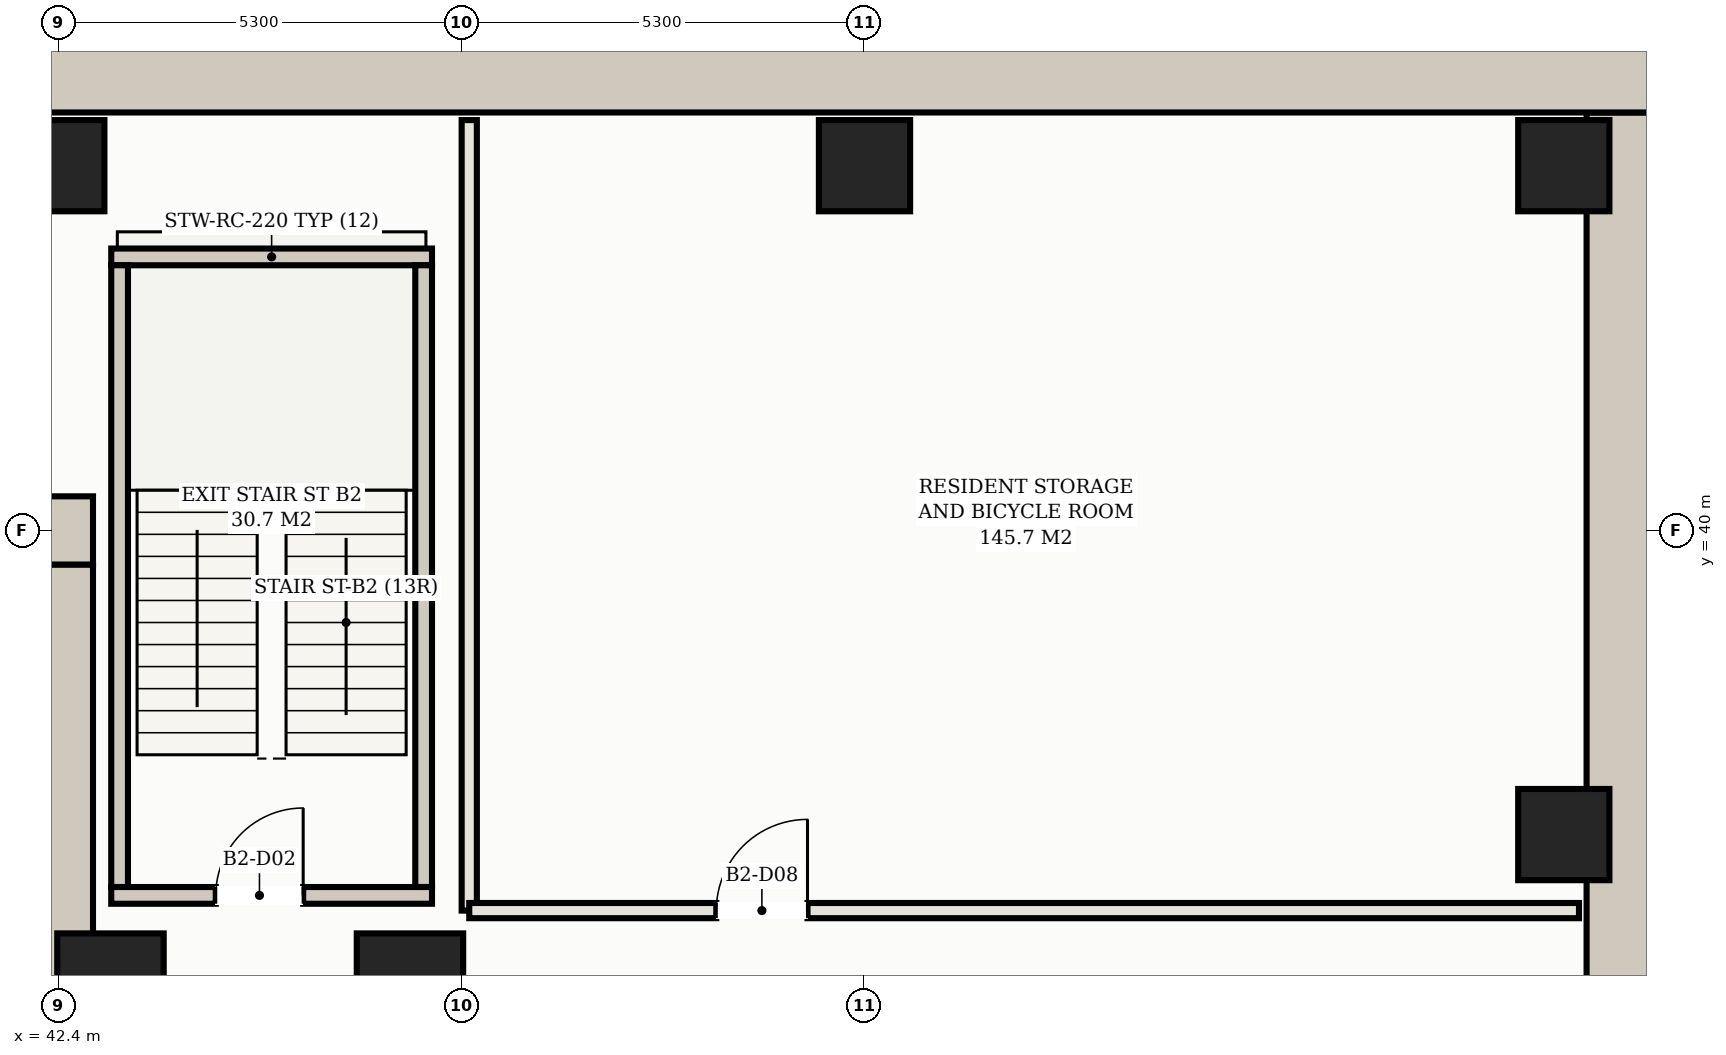
"""IFC4 building model, lengths in metres.
Left out: names, types, materials, properties, quantities, classifications, styles, units other than length and angle.
Written with IfcOpenShell. Run it as: python <this file> out.ifc"""

import sys

from ifc_helpers import new_model, si_unit, direction, frame, frame_2d, origin, origin_2d, place, context, subcontext, project, spatial, rectangle, hollow_rectangle, extrude, element, fill, save


model = new_model("IFC4")
c1 = context("Model", 3, precision=1e-05, world=origin(), true_north=direction((0.0, 1.0)))
c2 = subcontext(c1, "Body", "Model", "MODEL_VIEW")
j1 = project(units=[si_unit("LENGTHUNIT", "METRE"), si_unit("PLANEANGLEUNIT", "RADIAN")], contexts=[c1])
p1 = place(None, origin())
s1 = spatial("IfcSite", under=j1, at=p1, CompositionType="ELEMENT")
p2 = place(p1, origin())
s2 = spatial("IfcBuilding", under=s1, at=p2, CompositionType="ELEMENT")
p3 = place(p2, frame((0.0, 0.0, -8.4)))
s3 = spatial("IfcBuildingStorey", under=s2, at=p3, CompositionType="ELEMENT", Elevation=-8.4)
p4 = place(p3, frame((63.05, -7.3, 0.0), z_axis=(0.0, 0.0, 1.0), x_axis=(0.0, 1.0, 0.0)))
e1 = element("IfcWall", 1, at=p4, inside=s3, PredefinedType="USERDEFINED", context=c2, shape_type="SweptSolid", body=[
    extrude(rectangle(XDim=52.8, YDim=1.1, at=frame_2d((26.4, 0.0))), origin(), (0.0, 0.0, 1.0), 3.92),
])
p5 = place(p3, frame((63.6, 46.05, 0.0), z_axis=(0.0, 0.0, 1.0), x_axis=(-1.0, 0.0, 0.0)))
e2 = element("IfcWall", 2, at=p5, inside=s3, PredefinedType="USERDEFINED", context=c2, shape_type="SweptSolid", body=[
    extrude(rectangle(XDim=74.2, YDim=1.1, at=frame_2d((37.1, 0.0))), origin(), (0.0, 0.0, 1.0), 3.92),
])
p6 = place(p3, frame((10.15, 40.0, 0.0), z_axis=(0.0, 0.0, 1.0), x_axis=(1.0, 0.0, 0.0)))
e3 = element("IfcWall", 3, at=p6, inside=s3, PredefinedType="SHEAR", context=c2, shape_type="SweptSolid", body=[
    extrude(rectangle(XDim=32.7, YDim=0.9, at=frame_2d((16.35, 0.0))), origin(), (0.0, 0.0, 1.0), 3.92),
])
p7 = place(p3, frame((42.4, 25.65, 0.0), z_axis=(0.0, 0.0, 1.0), x_axis=(0.0, 1.0, 0.0)))
e4 = element("IfcWall", 4, at=p7, inside=s3, PredefinedType="SHEAR", context=c2, shape_type="SweptSolid", body=[
    extrude(rectangle(XDim=13.9, YDim=0.9, at=frame_2d((6.95, 0.0))), origin(), (0.0, 0.0, 1.0), 3.92),
])
for number, where, z_axis, x_axis in (
    (5, (42.4, 44.8, 0.0), (0.0, 0.0, 1.0), (1.0, 0.0, 0.0)),
    (6, (53.0, 44.8, 0.0), (0.0, 0.0, 1.0), (1.0, 0.0, 0.0)),
    (7, (62.2, 44.8, 0.0), (0.0, 0.0, 1.0), (1.0, 0.0, 0.0)),
    (8, (62.2, 36.0, 0.0), (0.0, 0.0, 1.0), (1.0, 0.0, 0.0)),
):
    element("IfcColumn", number, at=place(p3, frame(where, z_axis=z_axis, x_axis=x_axis)), inside=s3, PredefinedType="COLUMN", context=c2, shape_type="SweptSolid", body=[
        extrude(hollow_rectangle(XDim=1.2, YDim=1.2, WallThickness=0.04, at=origin_2d()), origin(), (0.0, 0.0, 1.0), 4.2),
    ])
for number, where, z_axis, x_axis in (
    (9, (47.02, 34.0, 0.0), (0.0, 0.0, 1.0), (1.0, 0.0, 0.0)),
    (10, (43.08, 34.0, 0.0), (0.0, 0.0, 1.0), (1.0, 0.0, 0.0)),
):
    element("IfcColumn", number, at=place(p3, frame(where, z_axis=z_axis, x_axis=x_axis)), inside=s3, PredefinedType="COLUMN", context=c2, shape_type="SweptSolid", body=[
        extrude(rectangle(XDim=1.4, YDim=1.4, at=origin_2d()), origin(), (0.0, 0.0, 1.0), 4.2),
    ])
p8 = place(p3, frame((43.09, 43.6, 0.0), z_axis=(0.0, 0.0, 1.0), x_axis=(1.0, 0.0, 0.0)))
e11 = element("IfcWall", 11, at=p8, inside=s3, PredefinedType="SHEAR", context=c2, shape_type="SweptSolid", body=[
    extrude(rectangle(XDim=4.22, YDim=0.22, at=frame_2d((2.11, 0.0))), origin(), (0.0, 0.0, 1.0), 3.92),
])
for number, where, z_axis, x_axis in (
    (12, (43.2, 35.31, 0.0), (0.0, 0.0, 1.0), (0.0, 1.0, 0.0)),
    (13, (47.2, 35.31, 0.0), (0.0, 0.0, 1.0), (0.0, 1.0, 0.0)),
):
    element("IfcWall", number, at=place(p3, frame(where, z_axis=z_axis, x_axis=x_axis)), inside=s3, PredefinedType="SHEAR", context=c2, shape_type="SweptSolid", body=[
        extrude(rectangle(XDim=8.18, YDim=0.22, at=frame_2d((4.09, 0.0))), origin(), (0.0, 0.0, 1.0), 3.92),
    ])
p9 = place(p3, frame((43.09, 35.2, 0.0), z_axis=(0.0, 0.0, 1.0), x_axis=(1.0, 0.0, 0.0)))
e14 = element("IfcWall", 14, at=p9, inside=s3, PredefinedType="SHEAR", context=c2, shape_type="SweptSolid", body=[
    extrude(rectangle(XDim=4.22, YDim=0.22, at=frame_2d((2.11, 0.0))), origin(), (0.0, 0.0, 1.0), 3.92),
])
p10 = place(p9, frame((1.375, 0.0, 0.0)))
e15 = element("IfcOpeningElement", 15, at=p10, cuts=e14, PredefinedType="OPENING", context=c2, shape_type="SweptSolid", body=[
    extrude(rectangle(XDim=1.15, YDim=2.2, at=frame_2d((0.575, 1.1))), frame((0.0, 0.12, 0.0), z_axis=(0.0, -1.0, 0.0), x_axis=(1.0, 0.0, 0.0)), (0.0, 0.0, 1.0), 0.24),
])
p11 = place(p3, frame((47.8, 35.0, 0.0), z_axis=(0.0, 0.0, 1.0), x_axis=(0.0, 1.0, 0.0)))
e16 = element("IfcWall", 16, at=p11, inside=s3, PredefinedType="PARTITIONING", context=c2, shape_type="SweptSolid", body=[
    extrude(rectangle(XDim=10.4, YDim=0.2, at=frame_2d((5.2, 0.0))), origin(), (0.0, 0.0, 1.0), 3.92),
])
p12 = place(p3, frame((47.8, 35.0, 0.0), z_axis=(0.0, 0.0, 1.0), x_axis=(1.0, 0.0, 0.0)))
e17 = element("IfcWall", 17, at=p12, inside=s3, PredefinedType="PARTITIONING", context=c2, shape_type="SweptSolid", body=[
    extrude(rectangle(XDim=14.6, YDim=0.2, at=frame_2d((7.3, 0.0))), origin(), (0.0, 0.0, 1.0), 3.92),
])
p13 = place(p12, frame((3.25, 0.0, 0.0)))
e18 = element("IfcOpeningElement", 18, at=p13, cuts=e17, PredefinedType="OPENING", context=c2, shape_type="SweptSolid", body=[
    extrude(rectangle(XDim=1.2, YDim=2.2, at=frame_2d((0.6, 1.1))), frame((0.0, 0.11, 0.0), z_axis=(0.0, -1.0, 0.0), x_axis=(1.0, 0.0, 0.0)), (0.0, 0.0, 1.0), 0.22),
])
p14 = place(p10, origin())
e19 = element("IfcDoor", 19, at=p14, inside=s3, OperationType="SINGLE_SWING_RIGHT", PredefinedType="DOOR", context=c2, shape_type="SweptSolid", body=[
    extrude(rectangle(XDim=1.15, YDim=2.2, at=frame_2d((0.575, 1.1))), frame((0.0, 0.025, 0.0), z_axis=(0.0, -1.0, 0.0), x_axis=(1.0, 0.0, 0.0)), (0.0, 0.0, 1.0), 0.05),
])
fill(e15, e19)
p15 = place(p13, origin())
e20 = element("IfcDoor", 20, at=p15, inside=s3, OperationType="SINGLE_SWING_RIGHT", PredefinedType="DOOR", context=c2, shape_type="SweptSolid", body=[
    extrude(rectangle(XDim=1.2, YDim=2.2, at=frame_2d((0.6, 1.1))), frame((0.0, 0.025, 0.0), z_axis=(0.0, -1.0, 0.0), x_axis=(1.0, 0.0, 0.0)), (0.0, 0.0, 1.0), 0.05),
])
fill(e18, e20)
save(model, sys.argv[1])
